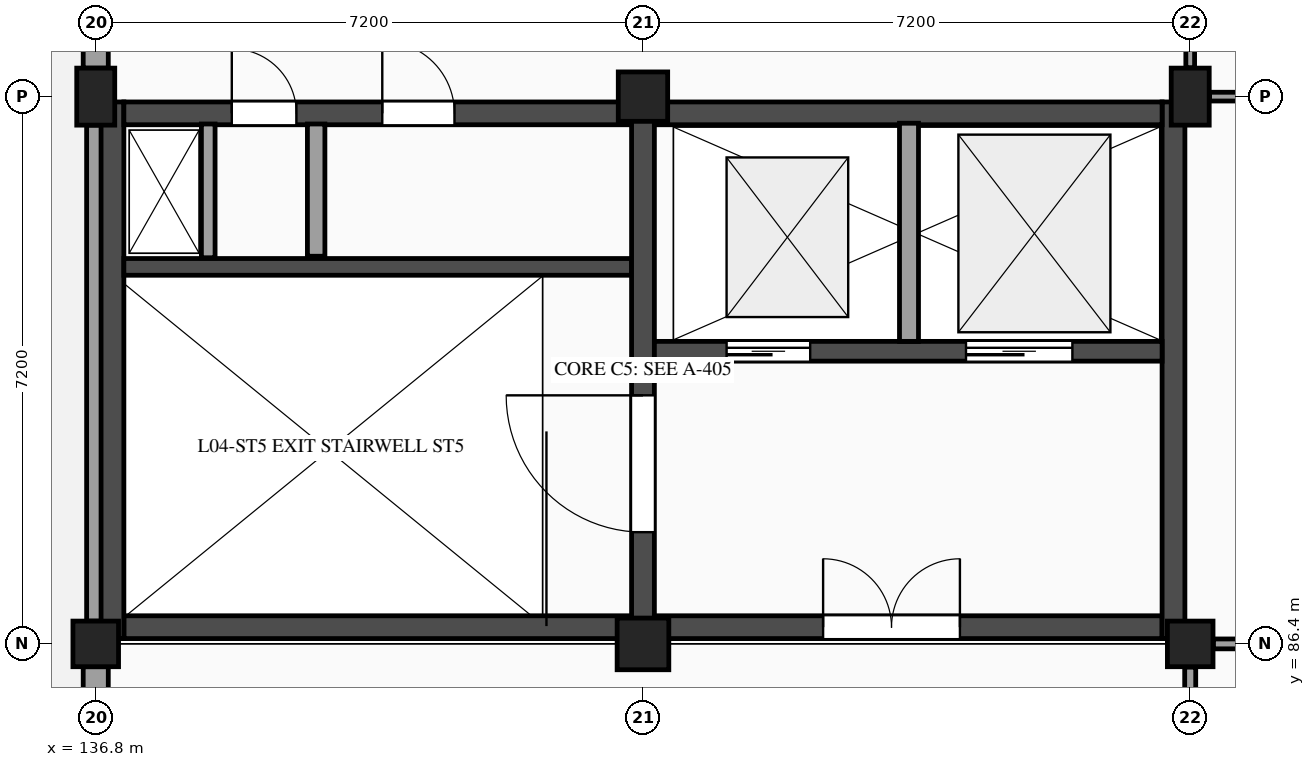
"""IFC4 building model, lengths in metres.
Left out: names, types, materials, properties, quantities, classifications, styles, units other than length and angle.
Written with IfcOpenShell. Run it as: python <this file> out.ifc"""

import sys

from ifc_helpers import new_model, si_unit, direction, frame, frame_2d, origin, origin_2d, place, context, subcontext, project, spatial, rectangle, extrude, element, fill, save


model = new_model("IFC4")
c1 = context("Model", 3, precision=1e-05, world=origin(), true_north=direction((0.0, 1.0)))
c2 = subcontext(c1, "Body", "Model", "MODEL_VIEW")
j1 = project(units=[si_unit("LENGTHUNIT", "METRE"), si_unit("PLANEANGLEUNIT", "RADIAN")], contexts=[c1])
p1 = place(None, origin())
s1 = spatial("IfcSite", under=j1, at=p1, CompositionType="ELEMENT")
p2 = place(p1, origin())
s2 = spatial("IfcBuilding", under=s1, at=p2, CompositionType="ELEMENT")
p3 = place(p2, frame((0.0, 0.0, 18.6)))
s3 = spatial("IfcBuildingStorey", under=s2, at=p3, CompositionType="ELEMENT", Elevation=18.6)
p4 = place(p3, frame((136.8, 86.4, 0.0), z_axis=(0.0, 0.0, 1.0), x_axis=(1.0, 0.0, 0.0)))
e1 = element("IfcColumn", 1, at=p4, inside=s3, PredefinedType="COLUMN", context=c2, shape_type="SweptSolid", body=[
    extrude(rectangle(XDim=0.6, YDim=0.6, at=origin_2d()), origin(), (0.0, 0.0, 1.0), 4.2),
])
p5 = place(p3, frame((136.8, 93.6, 0.0), z_axis=(0.0, 0.0, 1.0), x_axis=(1.0, 0.0, 0.0)))
e2 = element("IfcColumn", 2, at=p5, inside=s3, PredefinedType="COLUMN", context=c2, shape_type="SweptSolid", body=[
    extrude(rectangle(XDim=0.5, YDim=0.75, at=origin_2d()), origin(), (0.0, 0.0, 1.0), 4.2),
])
p6 = place(p3, frame((144.0, 86.4, 0.0), z_axis=(0.0, 0.0, 1.0), x_axis=(1.0, 0.0, 0.0)))
e3 = element("IfcColumn", 3, at=p6, inside=s3, PredefinedType="COLUMN", context=c2, shape_type="SweptSolid", body=[
    extrude(rectangle(XDim=0.68, YDim=0.68, at=origin_2d()), origin(), (0.0, 0.0, 1.0), 4.2),
])
p7 = place(p3, frame((144.0, 93.6, 0.0), z_axis=(0.0, 0.0, 1.0), x_axis=(1.0, 0.0, 0.0)))
e4 = element("IfcColumn", 4, at=p7, inside=s3, PredefinedType="COLUMN", context=c2, shape_type="SweptSolid", body=[
    extrude(rectangle(XDim=0.65, YDim=0.65, at=origin_2d()), origin(), (0.0, 0.0, 1.0), 4.2),
])
p8 = place(p3, frame((151.2, 86.4, 0.0), z_axis=(0.0, 0.0, 1.0), x_axis=(1.0, 0.0, 0.0)))
e5 = element("IfcColumn", 5, at=p8, inside=s3, PredefinedType="COLUMN", context=c2, shape_type="SweptSolid", body=[
    extrude(rectangle(XDim=0.6, YDim=0.6, at=origin_2d()), origin(), (0.0, 0.0, 1.0), 4.2),
])
p9 = place(p3, frame((151.2, 93.6, 0.0), z_axis=(0.0, 0.0, 1.0), x_axis=(1.0, 0.0, 0.0)))
e6 = element("IfcColumn", 6, at=p9, inside=s3, PredefinedType="COLUMN", context=c2, shape_type="SweptSolid", body=[
    extrude(rectangle(XDim=0.5, YDim=0.75, at=origin_2d()), origin(), (0.0, 0.0, 1.0), 4.2),
])
p10 = place(p3, frame((136.8, 79.51, 0.0), z_axis=(0.0, 0.0, 1.0), x_axis=(0.0, 1.0, 0.0)))
e7 = element("IfcWall", 7, at=p10, inside=s3, PredefinedType="STANDARD", context=c2, shape_type="SweptSolid", body=[
    extrude(rectangle(XDim=6.59, YDim=0.33, at=frame_2d((3.295, 0.0))), origin(), (0.0, 0.0, 1.0), 3.16),
])
p11 = place(p10, frame((2.745, 0.0, 0.0)))
e8 = element("IfcOpeningElement", 8, at=p11, cuts=e7, PredefinedType="OPENING", context=c2, shape_type="SweptSolid", body=[
    extrude(rectangle(XDim=1.1, YDim=2.2, at=frame_2d((0.55, 1.1))), frame((0.0, 0.175, 0.0), z_axis=(0.0, -1.0, 0.0), x_axis=(1.0, 0.0, 0.0)), (0.0, 0.0, 1.0), 0.35),
])
p12 = place(p3, frame((136.8, 86.7, 0.0), z_axis=(0.0, 0.0, 1.0), x_axis=(0.0, 1.0, 0.0)))
e9 = element("IfcWall", 9, at=p12, inside=s3, PredefinedType="STANDARD", context=c2, shape_type="SweptSolid", body=[
    extrude(rectangle(XDim=6.525, YDim=0.24, at=frame_2d((3.263, 0.0))), origin(), (0.0, 0.0, 1.0), 3.16),
])
p13 = place(p3, frame((136.8, 93.975, 0.0), z_axis=(0.0, 0.0, 1.0), x_axis=(0.0, 1.0, 0.0)))
e10 = element("IfcWall", 10, at=p13, inside=s3, PredefinedType="STANDARD", context=c2, shape_type="SweptSolid", body=[
    extrude(rectangle(XDim=6.505, YDim=0.33, at=frame_2d((3.252, 0.0))), origin(), (0.0, 0.0, 1.0), 3.16),
])
p14 = place(p13, frame((1.653, 0.0, 0.95)))
e11 = element("IfcOpeningElement", 11, at=p14, cuts=e10, PredefinedType="OPENING", context=c2, shape_type="SweptSolid", body=[
    extrude(rectangle(XDim=3.2, YDim=1.45, at=frame_2d((1.6, 0.725))), frame((0.0, 0.175, 0.0), z_axis=(0.0, -1.0, 0.0), x_axis=(1.0, 0.0, 0.0)), (0.0, 0.0, 1.0), 0.35),
])
p15 = place(p3, frame((137.17, 86.62, 0.0), z_axis=(0.0, 0.0, 1.0), x_axis=(1.0, 0.0, 0.0)))
e12 = element("IfcWall", 12, at=p15, inside=s3, PredefinedType="SHEAR", context=c2, shape_type="SweptSolid", body=[
    extrude(rectangle(XDim=6.68, YDim=0.3, at=frame_2d((3.34, 0.0))), origin(), (0.0, 0.0, 1.0), 3.955),
])
p16 = place(p3, frame((137.02, 93.53, 0.0), z_axis=(0.0, 0.0, 1.0), x_axis=(0.0, -1.0, 0.0)))
e13 = element("IfcWall", 13, at=p16, inside=s3, PredefinedType="SHEAR", context=c2, shape_type="SweptSolid", body=[
    extrude(rectangle(XDim=7.06, YDim=0.3, at=frame_2d((3.53, 0.0))), origin(), (0.0, 0.0, 1.0), 3.955),
])
p17 = place(p3, frame((137.17, 93.38, 0.0), z_axis=(0.0, 0.0, 1.0), x_axis=(1.0, 0.0, 0.0)))
e14 = element("IfcWall", 14, at=p17, inside=s3, PredefinedType="SHEAR", context=c2, shape_type="SweptSolid", body=[
    extrude(rectangle(XDim=6.68, YDim=0.3, at=frame_2d((3.34, 0.0))), origin(), (0.0, 0.0, 1.0), 3.955),
])
p18 = place(p17, frame((1.42, 0.0, 0.0)))
e15 = element("IfcOpeningElement", 15, at=p18, cuts=e14, PredefinedType="OPENING", context=c2, shape_type="SweptSolid", body=[
    extrude(rectangle(XDim=0.85, YDim=2.1, at=frame_2d((0.425, 1.05))), frame((0.0, 0.16, 0.0), z_axis=(0.0, -1.0, 0.0), x_axis=(1.0, 0.0, 0.0)), (0.0, 0.0, 1.0), 0.32),
])
p19 = place(p17, frame((3.4, 0.0, 0.0)))
e16 = element("IfcOpeningElement", 16, at=p19, cuts=e14, PredefinedType="OPENING", context=c2, shape_type="SweptSolid", body=[
    extrude(rectangle(XDim=0.95, YDim=2.15, at=frame_2d((0.475, 1.075))), frame((0.0, 0.16, 0.0), z_axis=(0.0, -1.0, 0.0), x_axis=(1.0, 0.0, 0.0)), (0.0, 0.0, 1.0), 0.32),
])
p20 = place(p3, frame((137.17, 91.36, 0.0), z_axis=(0.0, 0.0, 1.0), x_axis=(1.0, 0.0, 0.0)))
e17 = element("IfcWall", 17, at=p20, inside=s3, PredefinedType="SHEAR", context=c2, shape_type="SweptSolid", body=[
    extrude(rectangle(XDim=6.68, YDim=0.22, at=frame_2d((3.34, 0.0))), origin(), (0.0, 0.0, 1.0), 3.955),
])
p21 = place(p3, frame((139.7, 91.5, 0.0), z_axis=(0.0, 0.0, 1.0), x_axis=(0.0, 1.0, 0.0)))
e18 = element("IfcWall", 18, at=p21, inside=s3, PredefinedType="PARTITIONING", context=c2, shape_type="SweptSolid", body=[
    extrude(rectangle(XDim=1.74, YDim=0.23, at=frame_2d((0.87, 0.0))), origin(), (0.0, 0.0, 1.0), 3.955),
])
p22 = place(p3, frame((138.28, 91.48, 0.0), z_axis=(0.0, 0.0, 1.0), x_axis=(0.0, 1.0, 0.0)))
e19 = element("IfcWall", 19, at=p22, inside=s3, PredefinedType="PARTITIONING", context=c2, shape_type="SweptSolid", body=[
    extrude(rectangle(XDim=1.76, YDim=0.18, at=frame_2d((0.88, 0.0))), origin(), (0.0, 0.0, 1.0), 3.955),
])
p23 = place(p3, frame((144.0, 86.47, 0.0), z_axis=(0.0, 0.0, 1.0), x_axis=(0.0, 1.0, 0.0)))
e20 = element("IfcWall", 20, at=p23, inside=s3, PredefinedType="SHEAR", context=c2, shape_type="SweptSolid", body=[
    extrude(rectangle(XDim=7.06, YDim=0.3, at=frame_2d((3.53, 0.0))), origin(), (0.0, 0.0, 1.0), 3.955),
])
p24 = place(p23, frame((1.4, 0.0, 0.0)))
e21 = element("IfcOpeningElement", 21, at=p24, cuts=e20, PredefinedType="OPENING", context=c2, shape_type="SweptSolid", body=[
    extrude(rectangle(XDim=1.8, YDim=2.2, at=frame_2d((0.9, 1.1))), frame((0.0, 0.16, 0.0), z_axis=(0.0, -1.0, 0.0), x_axis=(1.0, 0.0, 0.0)), (0.0, 0.0, 1.0), 0.32),
])
p25 = place(p3, frame((144.15, 86.62, 0.0), z_axis=(0.0, 0.0, 1.0), x_axis=(1.0, 0.0, 0.0)))
e22 = element("IfcWall", 22, at=p25, inside=s3, PredefinedType="SHEAR", context=c2, shape_type="SweptSolid", body=[
    extrude(rectangle(XDim=6.68, YDim=0.3, at=frame_2d((3.34, 0.0))), origin(), (0.0, 0.0, 1.0), 3.955),
])
p26 = place(p25, frame((2.22, 0.0, 0.0)))
e23 = element("IfcOpeningElement", 23, at=p26, cuts=e22, PredefinedType="OPENING", context=c2, shape_type="SweptSolid", body=[
    extrude(rectangle(XDim=1.8, YDim=2.2, at=frame_2d((0.9, 1.1))), frame((0.0, 0.16, 0.0), z_axis=(0.0, -1.0, 0.0), x_axis=(1.0, 0.0, 0.0)), (0.0, 0.0, 1.0), 0.32),
])
p27 = place(p3, frame((150.98, 86.47, 0.0), z_axis=(0.0, 0.0, 1.0), x_axis=(0.0, 1.0, 0.0)))
e24 = element("IfcWall", 24, at=p27, inside=s3, PredefinedType="SHEAR", context=c2, shape_type="SweptSolid", body=[
    extrude(rectangle(XDim=7.06, YDim=0.3, at=frame_2d((3.53, 0.0))), origin(), (0.0, 0.0, 1.0), 3.955),
])
p28 = place(p3, frame((144.15, 93.38, 0.0), z_axis=(0.0, 0.0, 1.0), x_axis=(1.0, 0.0, 0.0)))
e25 = element("IfcWall", 25, at=p28, inside=s3, PredefinedType="SHEAR", context=c2, shape_type="SweptSolid", body=[
    extrude(rectangle(XDim=6.68, YDim=0.3, at=frame_2d((3.34, 0.0))), origin(), (0.0, 0.0, 1.0), 3.955),
])
p29 = place(p3, frame((144.15, 90.25, 0.0), z_axis=(0.0, 0.0, 1.0), x_axis=(1.0, 0.0, 0.0)))
e26 = element("IfcWall", 26, at=p29, inside=s3, PredefinedType="SHEAR", context=c2, shape_type="SweptSolid", body=[
    extrude(rectangle(XDim=6.68, YDim=0.26, at=frame_2d((3.34, 0.0))), origin(), (0.0, 0.0, 1.0), 3.955),
])
p30 = place(p29, frame((0.95, 0.0, 0.0)))
e27 = element("IfcOpeningElement", 27, at=p30, cuts=e26, PredefinedType="OPENING", context=c2, shape_type="SweptSolid", body=[
    extrude(rectangle(XDim=1.1, YDim=2.2, at=frame_2d((0.55, 1.1))), frame((0.0, 0.14, 0.0), z_axis=(0.0, -1.0, 0.0), x_axis=(1.0, 0.0, 0.0)), (0.0, 0.0, 1.0), 0.28),
])
p31 = place(p29, frame((4.1, 0.0, 0.0)))
e28 = element("IfcOpeningElement", 28, at=p31, cuts=e26, PredefinedType="OPENING", context=c2, shape_type="SweptSolid", body=[
    extrude(rectangle(XDim=1.4, YDim=2.3, at=frame_2d((0.7, 1.15))), frame((0.0, 0.14, 0.0), z_axis=(0.0, -1.0, 0.0), x_axis=(1.0, 0.0, 0.0)), (0.0, 0.0, 1.0), 0.28),
])
p32 = place(p3, frame((147.5, 90.38, 0.0), z_axis=(0.0, 0.0, 1.0), x_axis=(0.0, 1.0, 0.0)))
e29 = element("IfcWall", 29, at=p32, inside=s3, PredefinedType="PARTITIONING", context=c2, shape_type="SweptSolid", body=[
    extrude(rectangle(XDim=2.87, YDim=0.25, at=frame_2d((1.435, 0.0))), origin(), (0.0, 0.0, 1.0), 3.955),
])
p33 = place(p3, frame((151.2, 79.515, 0.0), z_axis=(0.0, 0.0, 1.0), x_axis=(0.0, 1.0, 0.0)))
e30 = element("IfcWall", 30, at=p33, inside=s3, PredefinedType="PARTITIONING", context=c2, shape_type="SweptSolid", body=[
    extrude(rectangle(XDim=6.58, YDim=0.145, at=frame_2d((3.29, 0.0))), origin(), (0.0, 0.0, 1.0), 3.28),
])
p34 = place(p3, frame((151.2, 93.98, 0.0), z_axis=(0.0, 0.0, 1.0), x_axis=(0.0, 1.0, 0.0)))
e31 = element("IfcWall", 31, at=p34, inside=s3, PredefinedType="PARTITIONING", context=c2, shape_type="SweptSolid", body=[
    extrude(rectangle(XDim=6.495, YDim=0.115, at=frame_2d((3.248, 0.0))), origin(), (0.0, 0.0, 1.0), 3.275),
])
p35 = place(p3, frame((151.505, 86.4, 0.0), z_axis=(0.0, 0.0, 1.0), x_axis=(1.0, 0.0, 0.0)))
e32 = element("IfcWall", 32, at=p35, inside=s3, PredefinedType="PARTITIONING", context=c2, shape_type="SweptSolid", body=[
    extrude(rectangle(XDim=6.55, YDim=0.13, at=frame_2d((3.275, 0.0))), origin(), (0.0, 0.0, 1.0), 3.265),
])
p36 = place(p3, frame((151.455, 93.6, 0.0), z_axis=(0.0, 0.0, 1.0), x_axis=(1.0, 0.0, 0.0)))
e33 = element("IfcWall", 33, at=p36, inside=s3, PredefinedType="PARTITIONING", context=c2, shape_type="SweptSolid", body=[
    extrude(rectangle(XDim=6.615, YDim=0.115, at=frame_2d((3.308, 0.0))), origin(), (0.0, 0.0, 1.0), 3.265),
])
p37 = place(p18, origin())
e34 = element("IfcDoor", 34, at=p37, inside=s3, OperationType="SINGLE_SWING_LEFT", PredefinedType="DOOR", context=c2, shape_type="SweptSolid", body=[
    extrude(rectangle(XDim=0.85, YDim=2.1, at=frame_2d((0.425, 1.05))), frame((0.0, 0.025, 0.0), z_axis=(0.0, -1.0, 0.0), x_axis=(1.0, 0.0, 0.0)), (0.0, 0.0, 1.0), 0.05),
])
fill(e15, e34)
p38 = place(p24, origin())
e35 = element("IfcDoor", 35, at=p38, inside=s3, OperationType="SINGLE_SWING_RIGHT", PredefinedType="DOOR", context=c2, shape_type="SweptSolid", body=[
    extrude(rectangle(XDim=1.8, YDim=2.2, at=frame_2d((0.9, 1.1))), frame((0.0, 0.025, 0.0), z_axis=(0.0, -1.0, 0.0), x_axis=(1.0, 0.0, 0.0)), (0.0, 0.0, 1.0), 0.05),
])
fill(e21, e35)
p39 = place(p19, origin())
e36 = element("IfcDoor", 36, at=p39, inside=s3, OperationType="SINGLE_SWING_LEFT", PredefinedType="DOOR", context=c2, shape_type="SweptSolid", body=[
    extrude(rectangle(XDim=0.95, YDim=2.15, at=frame_2d((0.475, 1.075))), frame((0.0, 0.025, 0.0), z_axis=(0.0, -1.0, 0.0), x_axis=(1.0, 0.0, 0.0)), (0.0, 0.0, 1.0), 0.05),
])
fill(e16, e36)
p40 = place(p30, origin())
e37 = element("IfcDoor", 37, at=p40, inside=s3, OperationType="SLIDING_TO_LEFT", PredefinedType="DOOR", context=c2, shape_type="SweptSolid", body=[
    extrude(rectangle(XDim=1.1, YDim=2.2, at=frame_2d((0.55, 1.1))), frame((0.0, 0.025, 0.0), z_axis=(0.0, -1.0, 0.0), x_axis=(1.0, 0.0, 0.0)), (0.0, 0.0, 1.0), 0.05),
])
fill(e27, e37)
p41 = place(p31, origin())
e38 = element("IfcDoor", 38, at=p41, inside=s3, OperationType="SLIDING_TO_RIGHT", PredefinedType="DOOR", context=c2, shape_type="SweptSolid", body=[
    extrude(rectangle(XDim=1.4, YDim=2.3, at=frame_2d((0.7, 1.15))), frame((0.0, 0.025, 0.0), z_axis=(0.0, -1.0, 0.0), x_axis=(1.0, 0.0, 0.0)), (0.0, 0.0, 1.0), 0.05),
])
fill(e28, e38)
p42 = place(p26, origin())
e39 = element("IfcDoor", 39, at=p42, inside=s3, OperationType="DOUBLE_DOOR_SINGLE_SWING", PredefinedType="DOOR", context=c2, shape_type="SweptSolid", body=[
    extrude(rectangle(XDim=1.8, YDim=2.2, at=frame_2d((0.9, 1.1))), frame((0.0, 0.025, 0.0), z_axis=(0.0, -1.0, 0.0), x_axis=(1.0, 0.0, 0.0)), (0.0, 0.0, 1.0), 0.05),
])
fill(e23, e39)
save(model, sys.argv[1])
